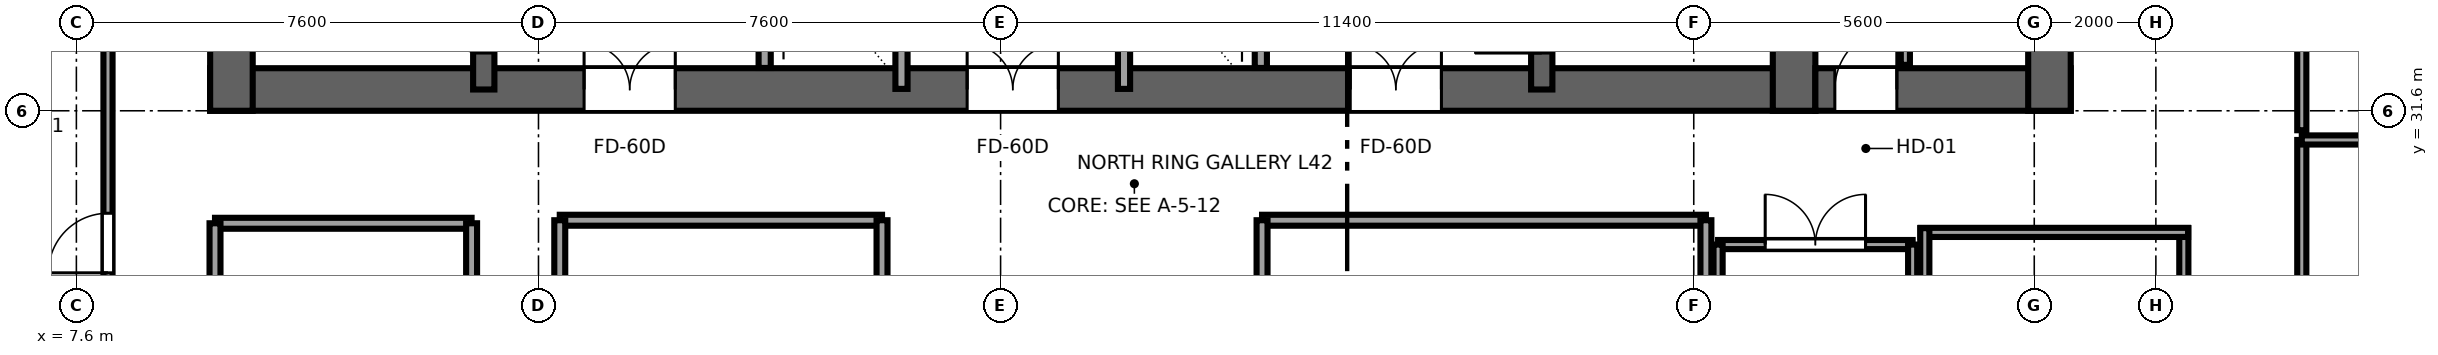
"""IFC4 building model, lengths in metres.
Left out: names, types, materials, properties, quantities, classifications, styles, units other than length and angle.
Written with IfcOpenShell. Run it as: python <this file> out.ifc"""

import sys

from ifc_helpers import new_model, si_unit, direction, frame, frame_2d, origin, place, context, subcontext, project, spatial, rectangle, extrude, source, transform, mapped, element, fill, save


model = new_model("IFC4")
c1 = context("Model", 3, precision=1e-05, world=origin(), true_north=direction((0.0, 1.0)))
c2 = subcontext(c1, "Body", "Model", "MODEL_VIEW")
j1 = project(units=[si_unit("LENGTHUNIT", "METRE"), si_unit("PLANEANGLEUNIT", "RADIAN")], contexts=[c1])
p1 = place(None, origin())
s1 = spatial("IfcSite", under=j1, at=p1, CompositionType="ELEMENT")
p2 = place(p1, origin())
s2 = spatial("IfcBuilding", under=s1, at=p2, CompositionType="ELEMENT")
p3 = place(p2, frame((0.0, 0.0, 161.25)))
s3 = spatial("IfcBuildingStorey", under=s2, at=p3, CompositionType="ELEMENT", Elevation=161.25)
p4 = place(p3, frame((9.8, 31.95, 0.0), z_axis=(0.0, 0.0, 1.0), x_axis=(1.0, 0.0, 0.0)))
e1 = element("IfcWall", 1, at=p4, inside=s3, PredefinedType="SHEAR", context=c2, shape_type="SweptSolid", body=[
    extrude(rectangle(XDim=26.4, YDim=0.7, at=frame_2d((13.2, 0.0))), origin(), (0.0, 0.0, 1.0), 3.55),
])
p5 = place(p4, frame((7.65, 0.0, 0.0), z_axis=(0.0, 0.0, 1.0), x_axis=(-1.0, 0.0, 0.0)))
e2 = element("IfcOpeningElement", 2, at=p5, cuts=e1, PredefinedType="OPENING", context=c2, shape_type="SweptSolid", body=[
    extrude(rectangle(XDim=1.5, YDim=2.04, at=frame_2d((0.75, 1.02))), frame((0.0, 0.36, 0.0), z_axis=(0.0, -1.0, 0.0), x_axis=(1.0, 0.0, 0.0)), (0.0, 0.0, 1.0), 0.72),
])
p6 = place(p4, frame((13.95, 0.0, 0.0), z_axis=(0.0, 0.0, 1.0), x_axis=(-1.0, 0.0, 0.0)))
e3 = element("IfcOpeningElement", 3, at=p6, cuts=e1, PredefinedType="OPENING", context=c2, shape_type="SweptSolid", body=[
    extrude(rectangle(XDim=1.5, YDim=2.04, at=frame_2d((0.75, 1.02))), frame((0.0, 0.36, 0.0), z_axis=(0.0, -1.0, 0.0), x_axis=(1.0, 0.0, 0.0)), (0.0, 0.0, 1.0), 0.72),
])
p7 = place(p4, frame((20.25, 0.0, 0.0), z_axis=(0.0, 0.0, 1.0), x_axis=(-1.0, 0.0, 0.0)))
e4 = element("IfcOpeningElement", 4, at=p7, cuts=e1, PredefinedType="OPENING", context=c2, shape_type="SweptSolid", body=[
    extrude(rectangle(XDim=1.5, YDim=2.04, at=frame_2d((0.75, 1.02))), frame((0.0, 0.36, 0.0), z_axis=(0.0, -1.0, 0.0), x_axis=(1.0, 0.0, 0.0)), (0.0, 0.0, 1.0), 0.72),
])
for number, where, z_axis, x_axis in (
    (5, (10.15, 31.6, 0.0), (0.0, 0.0, 1.0), (0.0, 1.0, 0.0)),
    (6, (35.85, 31.6, 0.0), (0.0, 0.0, 1.0), (0.0, 1.0, 0.0)),
):
    element("IfcWall", number, at=place(p3, frame(where, z_axis=z_axis, x_axis=x_axis)), inside=s3, PredefinedType="SHEAR", context=c2, shape_type="SweptSolid", body=[
        extrude(rectangle(XDim=13.6, YDim=0.7, at=frame_2d((6.8, 0.0))), origin(), (0.0, 0.0, 1.0), 3.55),
    ])
p8 = place(p3, frame((14.3, 31.95, 0.0), z_axis=(0.0, 0.0, 1.0), x_axis=(0.0, 1.0, 0.0)))
e7 = element("IfcWall", 7, at=p8, inside=s3, PredefinedType="SHEAR", context=c2, shape_type="SweptSolid", body=[
    extrude(rectangle(XDim=12.9, YDim=0.35, at=frame_2d((6.45, 0.0))), origin(), (0.0, 0.0, 1.0), 3.55),
])
p9 = place(p8, frame((0.6, 0.0, 0.0)))
e8 = element("IfcOpeningElement", 8, at=p9, cuts=e7, PredefinedType="OPENING", context=c2, shape_type="SweptSolid", body=[
    extrude(rectangle(XDim=1.1, YDim=2.12, at=frame_2d((0.55, 1.06))), frame((0.0, 0.185, 0.0), z_axis=(0.0, -1.0, 0.0), x_axis=(1.0, 0.0, 0.0)), (0.0, 0.0, 1.0), 0.37),
])
p10 = place(p3, frame((31.7, 31.95, 0.0), z_axis=(0.0, 0.0, 1.0), x_axis=(0.0, 1.0, 0.0)))
e9 = element("IfcWall", 9, at=p10, inside=s3, PredefinedType="SHEAR", context=c2, shape_type="SweptSolid", body=[
    extrude(rectangle(XDim=12.9, YDim=0.35, at=frame_2d((6.45, 0.0))), origin(), (0.0, 0.0, 1.0), 3.55),
])
p11 = place(p10, frame((1.7, 0.0, 0.0), z_axis=(0.0, 0.0, 1.0), x_axis=(-1.0, 0.0, 0.0)))
e10 = element("IfcOpeningElement", 10, at=p11, cuts=e9, PredefinedType="OPENING", context=c2, shape_type="SweptSolid", body=[
    extrude(rectangle(XDim=1.1, YDim=2.12, at=frame_2d((0.55, 1.06))), frame((0.0, 0.185, 0.0), z_axis=(0.0, -1.0, 0.0), x_axis=(1.0, 0.0, 0.0)), (0.0, 0.0, 1.0), 0.37),
])
p12 = place(p3, frame((36.2, 31.95, 0.0), z_axis=(0.0, 0.0, 1.0), x_axis=(1.0, 0.0, 0.0)))
e11 = element("IfcWall", 11, at=p12, inside=s3, PredefinedType="SHEAR", context=c2, shape_type="SweptSolid", body=[
    extrude(rectangle(XDim=4.2, YDim=0.7, at=frame_2d((2.1, 0.0))), origin(), (0.0, 0.0, 1.0), 3.55),
])
p13 = place(p12, frame((1.34, 0.0, 0.0), z_axis=(0.0, 0.0, 1.0), x_axis=(-1.0, 0.0, 0.0)))
e12 = element("IfcOpeningElement", 12, at=p13, cuts=e11, PredefinedType="OPENING", context=c2, shape_type="SweptSolid", body=[
    extrude(rectangle(XDim=1.02, YDim=2.03, at=frame_2d((0.51, 1.015))), frame((0.0, 0.36, 0.0), z_axis=(0.0, -1.0, 0.0), x_axis=(1.0, 0.0, 0.0)), (0.0, 0.0, 1.0), 0.72),
])
p14 = place(p3, frame((40.05, 31.6, 0.0), z_axis=(0.0, 0.0, 1.0), x_axis=(0.0, 1.0, 0.0)))
e13 = element("IfcWall", 13, at=p14, inside=s3, PredefinedType="SHEAR", context=c2, shape_type="SweptSolid", body=[
    extrude(rectangle(XDim=13.6, YDim=0.7, at=frame_2d((6.8, 0.0))), origin(), (0.0, 0.0, 1.0), 3.55),
])
for number, where, z_axis, x_axis in (
    (14, (18.92, 32.304, 0.0), (0.0, 0.0, 1.0), (0.0, 1.0, 0.0)),
    (15, (27.08, 32.304, 0.0), (0.0, 0.0, 1.0), (0.0, 1.0, 0.0)),
):
    element("IfcWall", number, at=place(p3, frame(where, z_axis=z_axis, x_axis=x_axis)), inside=s3, PredefinedType="SOLIDWALL", context=c2, shape_type="SweptSolid", body=[
        extrude(rectangle(XDim=3.846, YDim=0.2, at=frame_2d((1.923, 0.0))), origin(), (0.0, 0.0, 1.0), 3.37),
    ])
p15 = place(p3, frame((21.17, 31.96, 0.0), z_axis=(0.0, 0.0, 1.0), x_axis=(0.0, 1.0, 0.0)))
e16 = element("IfcWall", 16, at=p15, inside=s3, PredefinedType="SOLIDWALL", context=c2, shape_type="SweptSolid", body=[
    extrude(rectangle(XDim=12.58, YDim=0.2, at=frame_2d((6.29, 0.0))), origin(), (0.0, 0.0, 1.0), 3.37),
])
p16 = place(p15, frame((5.74, 0.0, 0.0)))
e17 = element("IfcOpeningElement", 17, at=p16, cuts=e16, PredefinedType="OPENING", context=c2, shape_type="SweptSolid", body=[
    extrude(rectangle(XDim=1.1, YDim=2.12, at=frame_2d((0.55, 1.06))), frame((0.0, 0.11, 0.0), z_axis=(0.0, -1.0, 0.0), x_axis=(1.0, 0.0, 0.0)), (0.0, 0.0, 1.0), 0.22),
])
p17 = place(p15, frame((8.24, 0.0, 0.0)))
e18 = element("IfcOpeningElement", 18, at=p17, cuts=e16, PredefinedType="OPENING", context=c2, shape_type="SweptSolid", body=[
    extrude(rectangle(XDim=1.1, YDim=2.12, at=frame_2d((0.55, 1.06))), frame((0.0, 0.11, 0.0), z_axis=(0.0, -1.0, 0.0), x_axis=(1.0, 0.0, 0.0)), (0.0, 0.0, 1.0), 0.22),
])
p18 = place(p3, frame((24.83, 31.96, 0.0), z_axis=(0.0, 0.0, 1.0), x_axis=(0.0, 1.0, 0.0)))
e19 = element("IfcWall", 19, at=p18, inside=s3, PredefinedType="SOLIDWALL", context=c2, shape_type="SweptSolid", body=[
    extrude(rectangle(XDim=12.58, YDim=0.2, at=frame_2d((6.29, 0.0))), origin(), (0.0, 0.0, 1.0), 3.37),
])
p19 = place(p18, frame((5.74, 0.0, 0.0)))
e20 = element("IfcOpeningElement", 20, at=p19, cuts=e19, PredefinedType="OPENING", context=c2, shape_type="SweptSolid", body=[
    extrude(rectangle(XDim=1.1, YDim=2.12, at=frame_2d((0.55, 1.06))), frame((0.0, 0.11, 0.0), z_axis=(0.0, -1.0, 0.0), x_axis=(1.0, 0.0, 0.0)), (0.0, 0.0, 1.0), 0.22),
])
p20 = place(p18, frame((8.24, 0.0, 0.0)))
e21 = element("IfcOpeningElement", 21, at=p20, cuts=e19, PredefinedType="OPENING", context=c2, shape_type="SweptSolid", body=[
    extrude(rectangle(XDim=1.1, YDim=2.12, at=frame_2d((0.55, 1.06))), frame((0.0, 0.11, 0.0), z_axis=(0.0, -1.0, 0.0), x_axis=(1.0, 0.0, 0.0)), (0.0, 0.0, 1.0), 0.22),
])
p21 = place(p3, frame((37.68, 32.355, 0.0), z_axis=(0.0, 0.0, 1.0), x_axis=(0.0, 1.0, 0.0)))
e22 = element("IfcWall", 22, at=p21, inside=s3, PredefinedType="PARTITIONING", context=c2, shape_type="SweptSolid", body=[
    extrude(rectangle(XDim=5.845, YDim=0.15, at=frame_2d((2.922, 0.0))), origin(), (0.0, 0.0, 1.0), 3.37),
])
p22 = place(p21, frame((2.413, 0.0, 0.0)))
e23 = element("IfcOpeningElement", 23, at=p22, cuts=e22, PredefinedType="OPENING", context=c2, shape_type="SweptSolid", body=[
    extrude(rectangle(XDim=1.02, YDim=2.03, at=frame_2d((0.51, 1.015))), frame((0.0, 0.085, 0.0), z_axis=(0.0, -1.0, 0.0), x_axis=(1.0, 0.0, 0.0)), (0.0, 0.0, 1.0), 0.17),
])
p23 = place(p3, frame((8.12, 24.73, 0.0), z_axis=(0.0, 0.0, 1.0), x_axis=(0.0, 1.0, 0.0)))
e24 = element("IfcWall", 24, at=p23, inside=s3, PredefinedType="PARTITIONING", context=c2, shape_type="SweptSolid", body=[
    extrude(rectangle(XDim=9.39, YDim=0.15, at=frame_2d((4.695, 0.0))), origin(), (0.0, 0.0, 1.0), 3.37),
])
p24 = place(p23, frame((4.205, 0.0, 0.0)))
e25 = element("IfcOpeningElement", 25, at=p24, cuts=e24, PredefinedType="OPENING", context=c2, shape_type="SweptSolid", body=[
    extrude(rectangle(XDim=0.98, YDim=2.12, at=frame_2d((0.49, 1.06))), frame((0.0, 0.085, 0.0), z_axis=(0.0, -1.0, 0.0), x_axis=(1.0, 0.0, 0.0)), (0.0, 0.0, 1.0), 0.17),
])
p25 = place(p3, frame((44.2, 23.78, 0.0), z_axis=(0.0, 0.0, 1.0), x_axis=(0.0, 1.0, 0.0)))
e26 = element("IfcWall", 26, at=p25, inside=s3, PredefinedType="PARTITIONING", context=c2, shape_type="SweptSolid", body=[
    extrude(rectangle(XDim=7.34, YDim=0.15, at=frame_2d((3.67, 0.0))), origin(), (0.0, 0.0, 1.0), 3.37),
])
p26 = place(p25, frame((3.18, 0.0, 0.0)))
e27 = element("IfcOpeningElement", 27, at=p26, cuts=e26, PredefinedType="OPENING", context=c2, shape_type="SweptSolid", body=[
    extrude(rectangle(XDim=0.98, YDim=2.12, at=frame_2d((0.49, 1.06))), frame((0.0, 0.085, 0.0), z_axis=(0.0, -1.0, 0.0), x_axis=(1.0, 0.0, 0.0)), (0.0, 0.0, 1.0), 0.17),
])
p27 = place(p3, frame((44.2, 31.12, 0.0), z_axis=(0.0, 0.0, 1.0), x_axis=(1.0, 0.0, 0.0)))
e28 = element("IfcWall", 28, at=p27, inside=s3, PredefinedType="PARTITIONING", context=c2, shape_type="SweptSolid", body=[
    extrude(rectangle(XDim=7.43, YDim=0.15, at=frame_2d((3.715, 0.0))), origin(), (0.0, 0.0, 1.0), 3.37),
])
p28 = place(p3, frame((44.2, 31.28, 0.0), z_axis=(0.0, 0.0, 1.0), x_axis=(0.0, 1.0, 0.0)))
e29 = element("IfcWall", 29, at=p28, inside=s3, PredefinedType="PARTITIONING", context=c2, shape_type="SweptSolid", body=[
    extrude(rectangle(XDim=6.24, YDim=0.15, at=frame_2d((3.12, 0.0))), origin(), (0.0, 0.0, 1.0), 3.37),
])
p29 = place(p28, frame((2.63, 0.0, 0.0)))
e30 = element("IfcOpeningElement", 30, at=p29, cuts=e29, PredefinedType="OPENING", context=c2, shape_type="SweptSolid", body=[
    extrude(rectangle(XDim=0.98, YDim=2.12, at=frame_2d((0.49, 1.06))), frame((0.0, 0.085, 0.0), z_axis=(0.0, -1.0, 0.0), x_axis=(1.0, 0.0, 0.0)), (0.0, 0.0, 1.0), 0.17),
])
p30 = place(p3, frame((42.26, 25.93, 0.0), z_axis=(0.0, 0.0, 1.0), x_axis=(0.0, 1.0, 0.0)))
e31 = element("IfcWall", 31, at=p30, inside=s3, PredefinedType="PARTITIONING", context=c2, shape_type="SweptSolid", body=[
    extrude(rectangle(XDim=3.74, YDim=0.15, at=frame_2d((1.87, 0.0))), origin(), (0.0, 0.0, 1.0), 3.37),
])
p31 = place(p30, frame((1.19, 0.0, 0.0)))
e32 = element("IfcOpeningElement", 32, at=p31, cuts=e31, PredefinedType="OPENING", context=c2, shape_type="SweptSolid", body=[
    extrude(rectangle(XDim=0.92, YDim=2.01, at=frame_2d((0.46, 1.005))), frame((0.0, 0.085, 0.0), z_axis=(0.0, -1.0, 0.0), x_axis=(1.0, 0.0, 0.0)), (0.0, 0.0, 1.0), 0.17),
])
p32 = place(p3, frame((37.93, 29.6, 0.0), z_axis=(0.0, 0.0, 1.0), x_axis=(1.0, 0.0, 0.0)))
e33 = element("IfcWall", 33, at=p32, inside=s3, PredefinedType="PARTITIONING", context=c2, shape_type="SweptSolid", body=[
    extrude(rectangle(XDim=4.4, YDim=0.15, at=frame_2d((2.2, 0.0))), origin(), (0.0, 0.0, 1.0), 3.37),
])
p33 = place(p3, frame((38.0, 25.93, 0.0), z_axis=(0.0, 0.0, 1.0), x_axis=(0.0, 1.0, 0.0)))
e34 = element("IfcWall", 34, at=p33, inside=s3, PredefinedType="PARTITIONING", context=c2, shape_type="SweptSolid", body=[
    extrude(rectangle(XDim=3.74, YDim=0.15, at=frame_2d((1.87, 0.0))), origin(), (0.0, 0.0, 1.0), 3.37),
])
p34 = place(p3, frame((9.88, 29.75, 0.0), z_axis=(0.0, 0.0, 1.0), x_axis=(1.0, 0.0, 0.0)))
e35 = element("IfcWall", 35, at=p34, inside=s3, PredefinedType="PARTITIONING", context=c2, shape_type="SweptSolid", body=[
    extrude(rectangle(XDim=4.22, YDim=0.18, at=frame_2d((2.11, 0.0))), origin(), (0.0, 0.0, 1.0), 3.37),
])
for number, where, z_axis, x_axis in (
    (36, (9.88, 23.7, 0.0), (0.0, 0.0, 1.0), (0.0, 1.0, 0.0)),
    (37, (14.1, 23.7, 0.0), (0.0, 0.0, 1.0), (0.0, 1.0, 0.0)),
):
    element("IfcWall", number, at=place(p3, frame(where, z_axis=z_axis, x_axis=x_axis)), inside=s3, PredefinedType="PARTITIONING", context=c2, shape_type="SweptSolid", body=[
        extrude(rectangle(XDim=6.05, YDim=0.18, at=frame_2d((3.025, 0.0))), origin(), (0.0, 0.0, 1.0), 3.37),
    ])
p35 = place(p3, frame((27.1, 29.8, 0.0), z_axis=(0.0, 0.0, 1.0), x_axis=(1.0, 0.0, 0.0)))
e38 = element("IfcWall", 38, at=p35, inside=s3, PredefinedType="PARTITIONING", context=c2, shape_type="SweptSolid", body=[
    extrude(rectangle(XDim=7.3, YDim=0.18, at=frame_2d((3.65, 0.0))), origin(), (0.0, 0.0, 1.0), 3.37),
])
for number, where, z_axis, x_axis in (
    (39, (27.1, 23.7, 0.0), (0.0, 0.0, 1.0), (0.0, 1.0, 0.0)),
    (40, (34.4, 23.7, 0.0), (0.0, 0.0, 1.0), (0.0, 1.0, 0.0)),
):
    element("IfcWall", number, at=place(p3, frame(where, z_axis=z_axis, x_axis=x_axis)), inside=s3, PredefinedType="PARTITIONING", context=c2, shape_type="SweptSolid", body=[
        extrude(rectangle(XDim=6.1, YDim=0.18, at=frame_2d((3.05, 0.0))), origin(), (0.0, 0.0, 1.0), 3.37),
    ])
p36 = place(p3, frame((15.55, 29.8, 0.0), z_axis=(0.0, 0.0, 1.0), x_axis=(1.0, 0.0, 0.0)))
e41 = element("IfcWall", 41, at=p36, inside=s3, PredefinedType="PARTITIONING", context=c2, shape_type="SweptSolid", body=[
    extrude(rectangle(XDim=5.3, YDim=0.18, at=frame_2d((2.65, 0.0))), origin(), (0.0, 0.0, 1.0), 3.37),
])
for number, where, z_axis, x_axis in (
    (42, (15.55, 23.7, 0.0), (0.0, 0.0, 1.0), (0.0, 1.0, 0.0)),
    (43, (20.85, 23.7, 0.0), (0.0, 0.0, 1.0), (0.0, 1.0, 0.0)),
):
    element("IfcWall", number, at=place(p3, frame(where, z_axis=z_axis, x_axis=x_axis)), inside=s3, PredefinedType="PARTITIONING", context=c2, shape_type="SweptSolid", body=[
        extrude(rectangle(XDim=6.1, YDim=0.18, at=frame_2d((3.05, 0.0))), origin(), (0.0, 0.0, 1.0), 3.37),
    ])
p37 = place(p3, frame((34.6, 29.4, 0.0), z_axis=(0.0, 0.0, 1.0), x_axis=(1.0, 0.0, 0.0)))
e44 = element("IfcWall", 44, at=p37, inside=s3, PredefinedType="PARTITIONING", context=c2, shape_type="SweptSolid", body=[
    extrude(rectangle(XDim=3.2, YDim=0.15, at=frame_2d((1.6, 0.0))), origin(), (0.0, 0.0, 1.0), 3.37),
])
p38 = place(p37, frame((0.775, 0.0, 0.0)))
e45 = element("IfcOpeningElement", 45, at=p38, cuts=e44, PredefinedType="OPENING", context=c2, shape_type="SweptSolid", body=[
    extrude(rectangle(XDim=1.65, YDim=2.15, at=frame_2d((0.825, 1.075))), frame((0.0, 0.085, 0.0), z_axis=(0.0, -1.0, 0.0), x_axis=(1.0, 0.0, 0.0)), (0.0, 0.0, 1.0), 0.17),
])
for number, where, z_axis, x_axis in (
    (46, (34.6, 23.7, 0.0), (0.0, 0.0, 1.0), (0.0, 1.0, 0.0)),
    (47, (37.8, 23.7, 0.0), (0.0, 0.0, 1.0), (0.0, 1.0, 0.0)),
):
    element("IfcWall", number, at=place(p3, frame(where, z_axis=z_axis, x_axis=x_axis)), inside=s3, PredefinedType="PARTITIONING", context=c2, shape_type="SweptSolid", body=[
        extrude(rectangle(XDim=5.7, YDim=0.15, at=frame_2d((2.85, 0.0))), origin(), (0.0, 0.0, 1.0), 3.37),
    ])
m1 = source(origin(), c2, "Body", "SweptSolid", [
    extrude(rectangle(XDim=1.1, YDim=2.12, at=frame_2d((0.55, 1.06))), frame((0.0, 0.025, 0.0), z_axis=(0.0, -1.0, 0.0), x_axis=(1.0, 0.0, 0.0)), (0.0, 0.0, 1.0), 0.05),
])
p39 = place(p9, origin())
e48 = element("IfcDoor", 48, at=p39, inside=s3, OperationType="SINGLE_SWING_RIGHT", PredefinedType="DOOR", context=c2, shape_type="MappedRepresentation", body=[
    mapped(m1, transform((0.0, 0.0, 0.0), x_axis=(1.0, 0.0, 0.0), y_axis=(0.0, 1.0, 0.0), z_axis=(0.0, 0.0, 1.0), scale=1.0)),
])
fill(e8, e48)
p40 = place(p11, origin())
e49 = element("IfcDoor", 49, at=p40, inside=s3, OperationType="SINGLE_SWING_LEFT", PredefinedType="DOOR", context=c2, shape_type="MappedRepresentation", body=[
    mapped(m1, transform((0.0, 0.0, 0.0), x_axis=(1.0, 0.0, 0.0), y_axis=(0.0, 1.0, 0.0), z_axis=(0.0, 0.0, 1.0), scale=1.0)),
])
fill(e10, e49)
m2 = source(origin(), c2, "Body", "SweptSolid", [
    extrude(rectangle(XDim=1.5, YDim=2.04, at=frame_2d((0.75, 1.02))), frame((0.0, 0.025, 0.0), z_axis=(0.0, -1.0, 0.0), x_axis=(1.0, 0.0, 0.0)), (0.0, 0.0, 1.0), 0.05),
])
p41 = place(p5, origin())
e50 = element("IfcDoor", 50, at=p41, inside=s3, OperationType="DOUBLE_DOOR_SINGLE_SWING", PredefinedType="DOOR", context=c2, shape_type="MappedRepresentation", body=[
    mapped(m2, transform((0.0, 0.0, 0.0), x_axis=(1.0, 0.0, 0.0), y_axis=(0.0, 1.0, 0.0), z_axis=(0.0, 0.0, 1.0), scale=1.0)),
])
fill(e2, e50)
p42 = place(p6, origin())
e51 = element("IfcDoor", 51, at=p42, inside=s3, OperationType="DOUBLE_DOOR_SINGLE_SWING", PredefinedType="DOOR", context=c2, shape_type="MappedRepresentation", body=[
    mapped(m2, transform((0.0, 0.0, 0.0), x_axis=(1.0, 0.0, 0.0), y_axis=(0.0, 1.0, 0.0), z_axis=(0.0, 0.0, 1.0), scale=1.0)),
])
fill(e3, e51)
p43 = place(p7, origin())
e52 = element("IfcDoor", 52, at=p43, inside=s3, OperationType="DOUBLE_DOOR_SINGLE_SWING", PredefinedType="DOOR", context=c2, shape_type="MappedRepresentation", body=[
    mapped(m2, transform((0.0, 0.0, 0.0), x_axis=(1.0, 0.0, 0.0), y_axis=(0.0, 1.0, 0.0), z_axis=(0.0, 0.0, 1.0), scale=1.0)),
])
fill(e4, e52)
m3 = source(origin(), c2, "Body", "SweptSolid", [
    extrude(rectangle(XDim=1.02, YDim=2.03, at=frame_2d((0.51, 1.015))), frame((0.0, 0.025, 0.0), z_axis=(0.0, -1.0, 0.0), x_axis=(1.0, 0.0, 0.0)), (0.0, 0.0, 1.0), 0.05),
])
p44 = place(p13, origin())
e53 = element("IfcDoor", 53, at=p44, inside=s3, OperationType="SINGLE_SWING_RIGHT", PredefinedType="DOOR", context=c2, shape_type="MappedRepresentation", body=[
    mapped(m3, transform((0.0, 0.0, 0.0), x_axis=(1.0, 0.0, 0.0), y_axis=(0.0, 1.0, 0.0), z_axis=(0.0, 0.0, 1.0), scale=1.0)),
])
fill(e12, e53)
m4 = source(origin(), c2, "Body", "SweptSolid", [
    extrude(rectangle(XDim=0.98, YDim=2.12, at=frame_2d((0.49, 1.06))), frame((0.0, 0.025, 0.0), z_axis=(0.0, -1.0, 0.0), x_axis=(1.0, 0.0, 0.0)), (0.0, 0.0, 1.0), 0.05),
])
p45 = place(p24, origin())
e54 = element("IfcDoor", 54, at=p45, inside=s3, OperationType="SINGLE_SWING_LEFT", PredefinedType="DOOR", context=c2, shape_type="MappedRepresentation", body=[
    mapped(m4, transform((0.0, 0.0, 0.0), x_axis=(1.0, 0.0, 0.0), y_axis=(0.0, 1.0, 0.0), z_axis=(0.0, 0.0, 1.0), scale=1.0)),
])
fill(e25, e54)
m5 = source(origin(), c2, "Body", "SweptSolid", [
    extrude(rectangle(XDim=1.65, YDim=2.15, at=frame_2d((0.825, 1.075))), frame((0.0, 0.025, 0.0), z_axis=(0.0, -1.0, 0.0), x_axis=(1.0, 0.0, 0.0)), (0.0, 0.0, 1.0), 0.05),
])
p46 = place(p38, origin())
e55 = element("IfcDoor", 55, at=p46, inside=s3, OperationType="DOUBLE_DOOR_SINGLE_SWING", PredefinedType="DOOR", context=c2, shape_type="MappedRepresentation", body=[
    mapped(m5, transform((0.0, 0.0, 0.0), x_axis=(1.0, 0.0, 0.0), y_axis=(0.0, 1.0, 0.0), z_axis=(0.0, 0.0, 1.0), scale=1.0)),
])
fill(e45, e55)
save(model, sys.argv[1])
